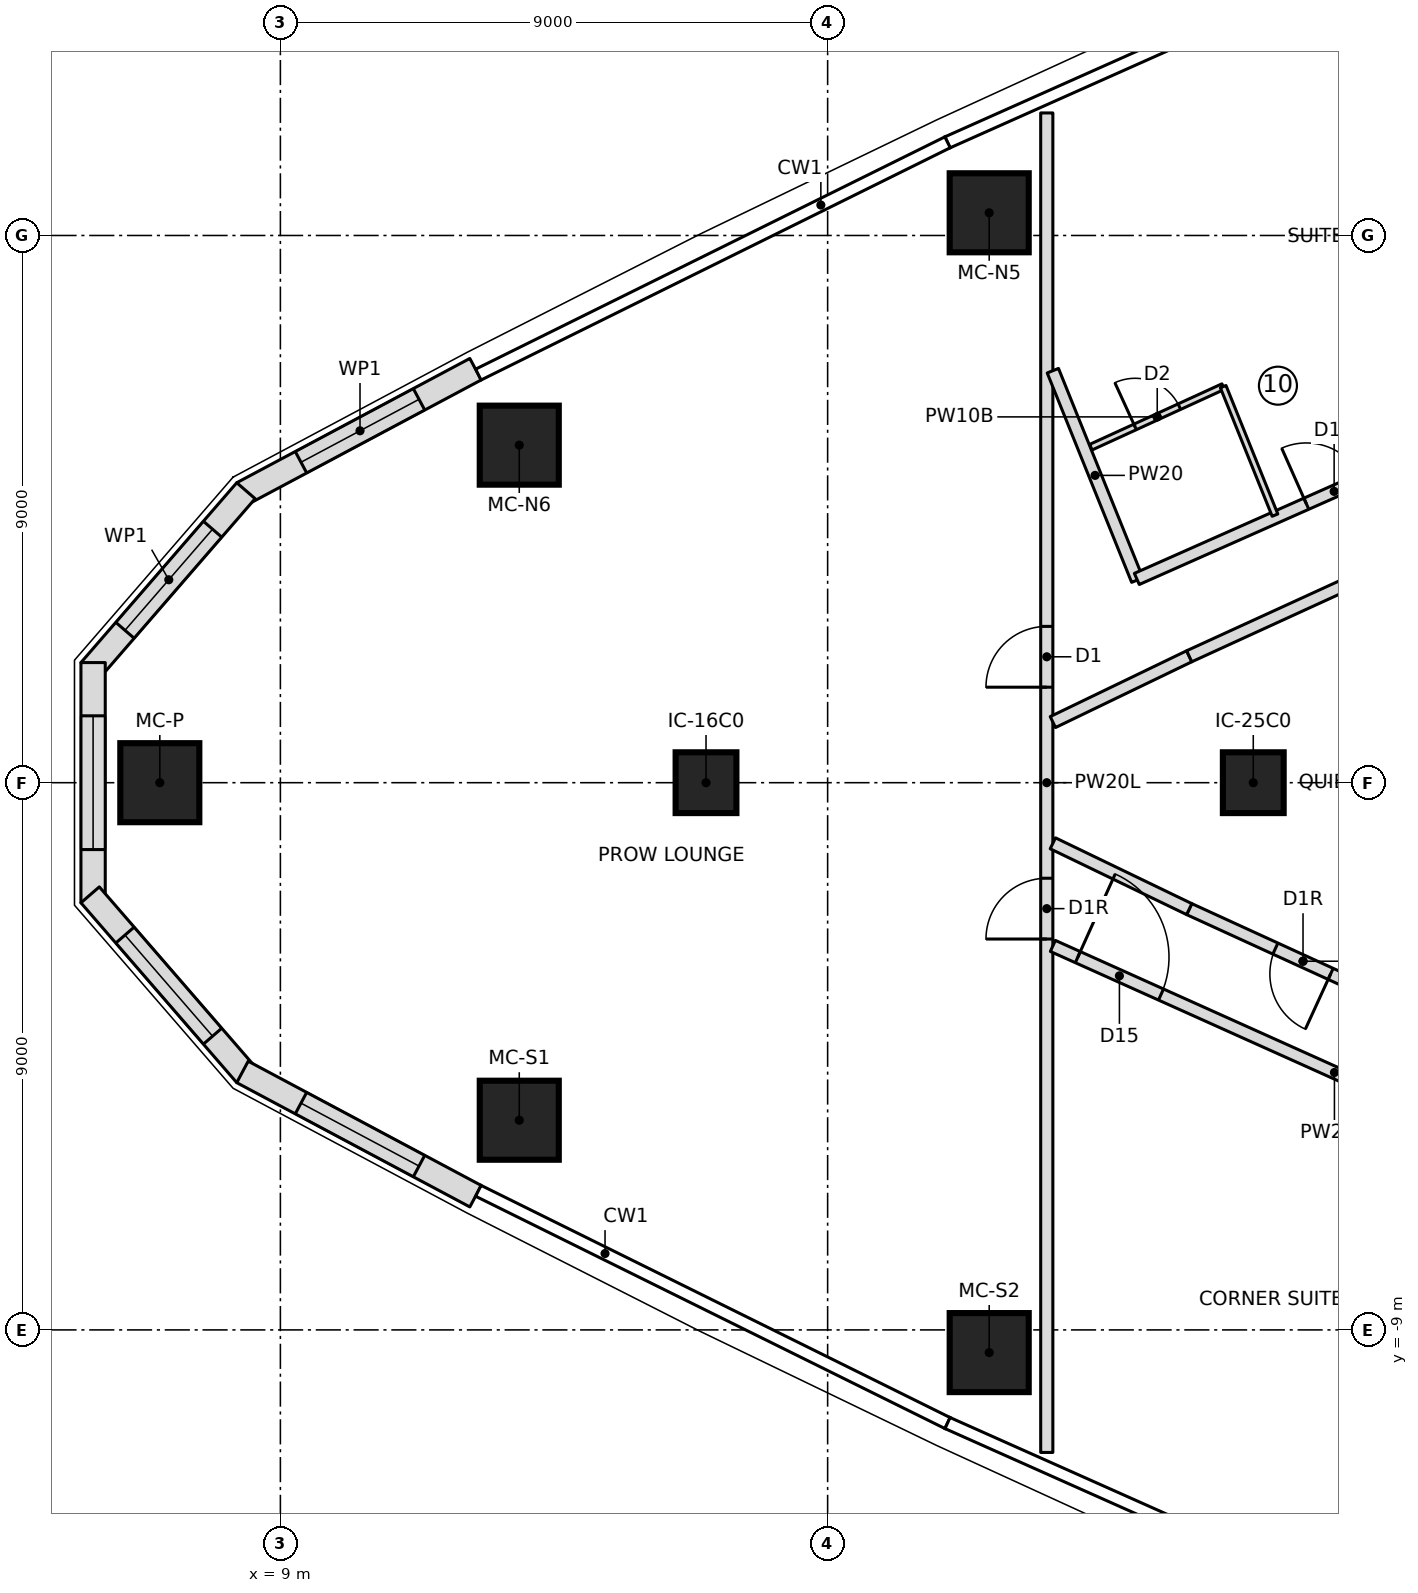
"""IFC4 building model, lengths in metres.
Left out: names, types, materials, properties, quantities, classifications, styles, units other than length and angle.
Written with IfcOpenShell. Run it as: python <this file> out.ifc"""

import sys

from ifc_helpers import new_model, si_unit, direction, frame, frame_2d, origin, origin_2d, place, context, subcontext, project, spatial, polyline, rectangle, outline, extrude, element, fill, save


model = new_model("IFC4")
c1 = context("Model", 3, precision=1e-05, world=origin(), true_north=direction((0.0, 1.0)))
c2 = subcontext(c1, "Body", "Model", "MODEL_VIEW")
j1 = project(units=[si_unit("LENGTHUNIT", "METRE"), si_unit("PLANEANGLEUNIT", "RADIAN")], contexts=[c1])
p1 = place(None, origin())
s1 = spatial("IfcSite", under=j1, at=p1, CompositionType="ELEMENT")
p2 = place(p1, origin())
s2 = spatial("IfcBuilding", under=s1, at=p2, CompositionType="ELEMENT")
p3 = place(p2, frame((0.0, 0.0, 175.5)))
s3 = spatial("IfcBuildingStorey", under=s2, at=p3, CompositionType="ELEMENT", Elevation=175.5)
for number, where, z_axis, x_axis in (
    (1, (7.017, 0.0, 0.0), (0.0, 0.0, 1.0), (1.0, 0.0, 0.0)),
    (2, (12.929, -5.552, 0.0), (0.0, 0.0, 1.0), (1.0, 0.0, 0.0)),
    (3, (20.657, -9.373, 0.0), (0.0, 0.0, 1.0), (1.0, 0.0, 0.0)),
    (4, (20.657, 9.373, 0.0), (0.0, 0.0, 1.0), (1.0, 0.0, 0.0)),
    (5, (12.929, 5.552, 0.0), (0.0, 0.0, 1.0), (1.0, 0.0, 0.0)),
):
    element("IfcColumn", number, at=place(p3, frame(where, z_axis=z_axis, x_axis=x_axis)), inside=s3, PredefinedType="COLUMN", context=c2, shape_type="SweptSolid", body=[
        extrude(rectangle(XDim=1.3, YDim=1.3, at=origin_2d()), origin(), (0.0, 0.0, 1.0), 3.55),
    ])
for number, where, z_axis, x_axis in (
    (6, (16.0, 0.0, 0.0), (0.0, 0.0, 1.0), (1.0, 0.0, 0.0)),
    (7, (25.0, 0.0, 0.0), (0.0, 0.0, 1.0), (1.0, 0.0, 0.0)),
):
    element("IfcColumn", number, at=place(p3, frame(where, z_axis=z_axis, x_axis=x_axis)), inside=s3, PredefinedType="COLUMN", context=c2, shape_type="SweptSolid", body=[
        extrude(rectangle(XDim=1.0, YDim=1.0, at=origin_2d()), origin(), (0.0, 0.0, 1.0), 3.55),
    ])
p4 = place(p3, frame((12.21, 6.801, 0.0), z_axis=(0.0, 0.0, 1.0), x_axis=(-0.882385889746, -0.470526451518, 0.0)))
e8 = element("IfcWall", 8, at=p4, inside=s3, PredefinedType="NOTDEFINED", context=c2, shape_type="SweptSolid", body=[
    extrude(outline(polyline([(0.0, -0.2), (4.344, -0.2), (4.27, 0.2), (0.0, 0.2), (0.0, -0.2)])), origin(), (0.0, 0.0, 1.0), 3.25),
])
p5 = place(p4, frame((1.053, 0.0, 0.6)))
e9 = element("IfcOpeningElement", 9, at=p5, cuts=e8, PredefinedType="OPENING", context=c2, shape_type="SweptSolid", body=[
    extrude(outline(polyline([(0.0, 1.35), (0.084, 1.771), (0.322, 2.128), (0.679, 2.366), (1.1, 2.45), (1.521, 2.366), (1.878, 2.128), (2.116, 1.771), (2.2, 1.35), (2.2, 1.1), (2.116, 0.679), (1.878, 0.322), (1.521, 0.084), (1.1, 0.0), (0.679, 0.084), (0.322, 0.322), (0.084, 0.679), (0.0, 1.1), (0.0, 1.35)])), frame((0.0, 0.21, 0.0), z_axis=(0.0, -1.0, 0.0), x_axis=(1.0, 0.0, 0.0)), (0.0, 0.0, 1.0), 0.42),
])
p6 = place(p3, frame((8.409, 4.774, 0.0), z_axis=(0.0, 0.0, 1.0), x_axis=(-0.654759384203, -0.755837382509, 0.0)))
e10 = element("IfcWall", 10, at=p6, inside=s3, PredefinedType="NOTDEFINED", context=c2, shape_type="SweptSolid", body=[
    extrude(outline(polyline([(-0.037, -0.2), (3.876, -0.2), (3.727, 0.2), (0.037, 0.2), (-0.037, -0.2)])), origin(), (0.0, 0.0, 1.0), 3.25),
])
p7 = place(p6, frame((0.801, 0.0, 0.6)))
e11 = element("IfcOpeningElement", 11, at=p7, cuts=e10, PredefinedType="OPENING", context=c2, shape_type="SweptSolid", body=[
    extrude(outline(polyline([(0.0, 1.35), (0.084, 1.771), (0.322, 2.128), (0.679, 2.366), (1.1, 2.45), (1.521, 2.366), (1.878, 2.128), (2.116, 1.771), (2.2, 1.35), (2.2, 1.1), (2.116, 0.679), (1.878, 0.322), (1.521, 0.084), (1.1, 0.0), (0.679, 0.084), (0.322, 0.322), (0.084, 0.679), (0.0, 1.1), (0.0, 1.35)])), frame((0.0, 0.21, 0.0), z_axis=(0.0, -1.0, 0.0), x_axis=(1.0, 0.0, 0.0)), (0.0, 0.0, 1.0), 0.42),
])
p8 = place(p3, frame((5.92, 1.901, 0.0), z_axis=(0.0, 0.0, 1.0), x_axis=(0.0, -1.0, 0.0)))
e12 = element("IfcWall", 12, at=p8, inside=s3, PredefinedType="NOTDEFINED", context=c2, shape_type="SweptSolid", body=[
    extrude(outline(polyline([(-0.075, -0.2), (3.876, -0.2), (3.727, 0.2), (0.075, 0.2), (-0.075, -0.2)])), origin(), (0.0, 0.0, 1.0), 3.25),
])
p9 = place(p8, frame((0.801, 0.0, 0.6)))
e13 = element("IfcOpeningElement", 13, at=p9, cuts=e12, PredefinedType="OPENING", context=c2, shape_type="SweptSolid", body=[
    extrude(outline(polyline([(0.0, 1.35), (0.084, 1.771), (0.322, 2.128), (0.679, 2.366), (1.1, 2.45), (1.521, 2.366), (1.878, 2.128), (2.116, 1.771), (2.2, 1.35), (2.2, 1.1), (2.116, 0.679), (1.878, 0.322), (1.521, 0.084), (1.1, 0.0), (0.679, 0.084), (0.322, 0.322), (0.084, 0.679), (0.0, 1.1), (0.0, 1.35)])), frame((0.0, 0.21, 0.0), z_axis=(0.0, -1.0, 0.0), x_axis=(1.0, 0.0, 0.0)), (0.0, 0.0, 1.0), 0.42),
])
p10 = place(p3, frame((5.92, -1.901, 0.0), z_axis=(0.0, 0.0, 1.0), x_axis=(0.654759384203, -0.755837382509, 0.0)))
e14 = element("IfcWall", 14, at=p10, inside=s3, PredefinedType="NOTDEFINED", context=c2, shape_type="SweptSolid", body=[
    extrude(outline(polyline([(-0.075, -0.2), (3.839, -0.2), (3.765, 0.2), (0.075, 0.2), (-0.075, -0.2)])), origin(), (0.0, 0.0, 1.0), 3.25),
])
p11 = place(p10, frame((0.801, 0.0, 0.6)))
e15 = element("IfcOpeningElement", 15, at=p11, cuts=e14, PredefinedType="OPENING", context=c2, shape_type="SweptSolid", body=[
    extrude(outline(polyline([(0.0, 1.35), (0.084, 1.771), (0.322, 2.128), (0.679, 2.366), (1.1, 2.45), (1.521, 2.366), (1.878, 2.128), (2.116, 1.771), (2.2, 1.35), (2.2, 1.1), (2.116, 0.679), (1.878, 0.322), (1.521, 0.084), (1.1, 0.0), (0.679, 0.084), (0.322, 0.322), (0.084, 0.679), (0.0, 1.1), (0.0, 1.35)])), frame((0.0, 0.21, 0.0), z_axis=(0.0, -1.0, 0.0), x_axis=(1.0, 0.0, 0.0)), (0.0, 0.0, 1.0), 0.42),
])
p12 = place(p3, frame((8.409, -4.774, 0.0), z_axis=(0.0, 0.0, 1.0), x_axis=(0.882385889746, -0.470526451518, 0.0)))
e16 = element("IfcWall", 16, at=p12, inside=s3, PredefinedType="NOTDEFINED", context=c2, shape_type="SweptSolid", body=[
    extrude(outline(polyline([(-0.037, -0.2), (4.307, -0.2), (4.307, 0.2), (0.037, 0.2), (-0.037, -0.2)])), origin(), (0.0, 0.0, 1.0), 3.25),
])
p13 = place(p12, frame((1.053, 0.0, 0.6)))
e17 = element("IfcOpeningElement", 17, at=p13, cuts=e16, PredefinedType="OPENING", context=c2, shape_type="SweptSolid", body=[
    extrude(outline(polyline([(0.0, 1.35), (0.084, 1.771), (0.322, 2.128), (0.679, 2.366), (1.1, 2.45), (1.521, 2.366), (1.878, 2.128), (2.116, 1.771), (2.2, 1.35), (2.2, 1.1), (2.116, 0.679), (1.878, 0.322), (1.521, 0.084), (1.1, 0.0), (0.679, 0.084), (0.322, 0.322), (0.084, 0.679), (0.0, 1.1), (0.0, 1.35)])), frame((0.0, 0.21, 0.0), z_axis=(0.0, -1.0, 0.0), x_axis=(1.0, 0.0, 0.0)), (0.0, 0.0, 1.0), 0.42),
])
p14 = place(p3, frame((21.604, -11.015, 0.0), z_axis=(0.0, 0.0, 1.0), x_axis=(0.0, 1.0, 0.0)))
e18 = element("IfcWall", 18, at=p14, inside=s3, PredefinedType="PARTITIONING", context=c2, shape_type="SweptSolid", body=[
    extrude(rectangle(XDim=22.031, YDim=0.2, at=frame_2d((11.015, 0.0))), origin(), (0.0, 0.0, 1.0), 3.25),
])
p15 = place(p14, frame((12.586, 0.0, 0.0)))
e19 = element("IfcOpeningElement", 19, at=p15, cuts=e18, PredefinedType="OPENING", context=c2, shape_type="SweptSolid", body=[
    extrude(rectangle(XDim=1.0, YDim=2.1, at=frame_2d((0.5, 1.05))), frame((0.0, 0.11, 0.0), z_axis=(0.0, -1.0, 0.0), x_axis=(1.0, 0.0, 0.0)), (0.0, 0.0, 1.0), 0.22),
])
p16 = place(p14, frame((8.444, 0.0, 0.0)))
e20 = element("IfcOpeningElement", 20, at=p16, cuts=e18, PredefinedType="OPENING", context=c2, shape_type="SweptSolid", body=[
    extrude(rectangle(XDim=1.0, YDim=2.1, at=frame_2d((0.5, 1.05))), frame((0.0, 0.11, 0.0), z_axis=(0.0, -1.0, 0.0), x_axis=(1.0, 0.0, 0.0)), (0.0, 0.0, 1.0), 0.22),
])
p17 = place(p3, frame((23.092, 3.333, 0.0), z_axis=(0.0, 0.0, 1.0), x_axis=(-0.373883495288, 0.927475677283, 0.0)))
e21 = element("IfcWall", 21, at=p17, inside=s3, PredefinedType="PARTITIONING", context=c2, shape_type="SweptSolid", body=[
    extrude(rectangle(XDim=3.713, YDim=0.2, at=frame_2d((1.856, 0.0))), origin(), (0.0, 0.0, 1.0), 3.25),
])
p18 = place(p3, frame((23.085, 3.351, 0.0), z_axis=(0.0, 0.0, 1.0), x_axis=(0.914065936171, 0.405565610392, 0.0)))
e22 = element("IfcWall", 22, at=p18, inside=s3, PredefinedType="PARTITIONING", context=c2, shape_type="SweptSolid", body=[
    extrude(rectangle(XDim=8.622, YDim=0.2, at=frame_2d((4.311, 0.0))), origin(), (0.0, 0.0, 1.0), 3.25),
])
p19 = place(p18, frame((3.05, 0.0, 0.0)))
e23 = element("IfcOpeningElement", 23, at=p19, cuts=e22, PredefinedType="OPENING", context=c2, shape_type="SweptSolid", body=[
    extrude(rectangle(XDim=1.0, YDim=2.1, at=frame_2d((0.5, 1.05))), frame((0.0, 0.11, 0.0), z_axis=(0.0, -1.0, 0.0), x_axis=(1.0, 0.0, 0.0)), (0.0, 0.0, 1.0), 0.22),
])
p20 = place(p3, frame((22.33, 5.518, 0.0), z_axis=(0.0, 0.0, 1.0), x_axis=(0.909209708064, 0.416338452178, 0.0)))
e24 = element("IfcWall", 24, at=p20, inside=s3, PredefinedType="PARTITIONING", context=c2, shape_type="SweptSolid", body=[
    extrude(rectangle(XDim=2.393, YDim=0.1, at=frame_2d((1.196, 0.0))), origin(), (0.0, 0.0, 1.0), 3.25),
])
p21 = place(p20, frame((0.8, 0.0, 0.0)))
e25 = element("IfcOpeningElement", 25, at=p21, cuts=e24, PredefinedType="OPENING", context=c2, shape_type="SweptSolid", body=[
    extrude(rectangle(XDim=0.8, YDim=2.1, at=frame_2d((0.4, 1.05))), frame((0.0, 0.06, 0.0), z_axis=(0.0, -1.0, 0.0), x_axis=(1.0, 0.0, 0.0)), (0.0, 0.0, 1.0), 0.12),
])
p22 = place(p3, frame((24.505, 6.514, 0.0), z_axis=(0.0, 0.0, 1.0), x_axis=(0.373919298041, -0.927461243693, 0.0)))
e26 = element("IfcWall", 26, at=p22, inside=s3, PredefinedType="PARTITIONING", context=c2, shape_type="SweptSolid", body=[
    extrude(rectangle(XDim=2.279, YDim=0.1, at=frame_2d((1.14, 0.0))), origin(), (0.0, 0.0, 1.0), 3.25),
])
p23 = place(p3, frame((21.704, -2.685, 0.0), z_axis=(0.0, 0.0, 1.0), x_axis=(0.912095082087, -0.409978732659, 0.0)))
e27 = element("IfcWall", 27, at=p23, inside=s3, PredefinedType="PARTITIONING", context=c2, shape_type="SweptSolid", body=[
    extrude(rectangle(XDim=10.154, YDim=0.2, at=frame_2d((5.077, 0.0))), origin(), (0.0, 0.0, 1.0), 3.25),
])
p24 = place(p23, frame((0.45, 0.0, 0.0)))
e28 = element("IfcOpeningElement", 28, at=p24, cuts=e27, PredefinedType="OPENING", context=c2, shape_type="SweptSolid", body=[
    extrude(rectangle(XDim=1.5, YDim=2.1, at=frame_2d((0.75, 1.05))), frame((0.0, 0.11, 0.0), z_axis=(0.0, -1.0, 0.0), x_axis=(1.0, 0.0, 0.0)), (0.0, 0.0, 1.0), 0.22),
])
p25 = place(p3, frame((27.69, -3.793, 0.0), z_axis=(0.0, 0.0, 1.0), x_axis=(-0.909180834404, 0.416401501382, 0.0)))
e29 = element("IfcWall", 29, at=p25, inside=s3, PredefinedType="PARTITIONING", context=c2, shape_type="SweptSolid", body=[
    extrude(rectangle(XDim=4.117, YDim=0.2, at=frame_2d((2.059, 0.0))), origin(), (0.0, 0.0, 1.0), 3.25),
])
p26 = place(p25, frame((1.559, 0.0, 0.0)))
e30 = element("IfcOpeningElement", 30, at=p26, cuts=e29, PredefinedType="OPENING", context=c2, shape_type="SweptSolid", body=[
    extrude(rectangle(XDim=1.0, YDim=2.1, at=frame_2d((0.5, 1.05))), frame((0.0, 0.11, 0.0), z_axis=(0.0, -1.0, 0.0), x_axis=(1.0, 0.0, 0.0)), (0.0, 0.0, 1.0), 0.22),
])
for number, where, z_axis, x_axis in (
    (31, (23.947, -2.079, 0.0), (0.0, 0.0, 1.0), (-0.901, 0.435, 0.0)),
    (32, (21.704, 0.997, 0.0), (0.0, 0.0, 1.0), (0.901, 0.435, 0.0)),
):
    element("IfcWall", number, at=place(p3, frame(where, z_axis=z_axis, x_axis=x_axis)), inside=s3, PredefinedType="PARTITIONING", context=c2, shape_type="SweptSolid", body=[
        extrude(rectangle(XDim=2.49, YDim=0.2, at=frame_2d((1.245, 0.0))), origin(), (0.0, 0.0, 1.0), 3.25),
    ])
p27 = place(p3, frame((23.947, 2.079, 0.0), z_axis=(0.0, 0.0, 1.0), x_axis=(0.909180834404, 0.416401501382, 0.0)))
e33 = element("IfcWall", 33, at=p27, inside=s3, PredefinedType="PARTITIONING", context=c2, shape_type="SweptSolid", body=[
    extrude(rectangle(XDim=4.117, YDim=0.2, at=frame_2d((2.059, 0.0))), origin(), (0.0, 0.0, 1.0), 3.25),
])
p28 = place(p5, origin())
e34 = element("IfcWindow", 34, at=p28, inside=s3, PartitioningType="SINGLE_PANEL", PredefinedType="WINDOW", context=c2, shape_type="SweptSolid", body=[
    extrude(outline(polyline([(0.0, 1.35), (0.084, 1.771), (0.322, 2.128), (0.679, 2.366), (1.1, 2.45), (1.521, 2.366), (1.878, 2.128), (2.116, 1.771), (2.2, 1.35), (2.2, 1.1), (2.116, 0.679), (1.878, 0.322), (1.521, 0.084), (1.1, 0.0), (0.679, 0.084), (0.322, 0.322), (0.084, 0.679), (0.0, 1.1), (0.0, 1.35)])), frame((0.0, 0.17, 0.0), z_axis=(0.0, -1.0, 0.0), x_axis=(1.0, 0.0, 0.0)), (0.0, 0.0, 1.0), 0.06),
])
fill(e9, e34)
p29 = place(p7, origin())
e35 = element("IfcWindow", 35, at=p29, inside=s3, PartitioningType="SINGLE_PANEL", PredefinedType="WINDOW", context=c2, shape_type="SweptSolid", body=[
    extrude(outline(polyline([(0.0, 1.35), (0.084, 1.771), (0.322, 2.128), (0.679, 2.366), (1.1, 2.45), (1.521, 2.366), (1.878, 2.128), (2.116, 1.771), (2.2, 1.35), (2.2, 1.1), (2.116, 0.679), (1.878, 0.322), (1.521, 0.084), (1.1, 0.0), (0.679, 0.084), (0.322, 0.322), (0.084, 0.679), (0.0, 1.1), (0.0, 1.35)])), frame((0.0, 0.17, 0.0), z_axis=(0.0, -1.0, 0.0), x_axis=(1.0, 0.0, 0.0)), (0.0, 0.0, 1.0), 0.06),
])
fill(e11, e35)
p30 = place(p9, origin())
e36 = element("IfcWindow", 36, at=p30, inside=s3, PartitioningType="SINGLE_PANEL", PredefinedType="WINDOW", context=c2, shape_type="SweptSolid", body=[
    extrude(outline(polyline([(0.0, 1.35), (0.084, 1.771), (0.322, 2.128), (0.679, 2.366), (1.1, 2.45), (1.521, 2.366), (1.878, 2.128), (2.116, 1.771), (2.2, 1.35), (2.2, 1.1), (2.116, 0.679), (1.878, 0.322), (1.521, 0.084), (1.1, 0.0), (0.679, 0.084), (0.322, 0.322), (0.084, 0.679), (0.0, 1.1), (0.0, 1.35)])), frame((0.0, 0.17, 0.0), z_axis=(0.0, -1.0, 0.0), x_axis=(1.0, 0.0, 0.0)), (0.0, 0.0, 1.0), 0.06),
])
fill(e13, e36)
p31 = place(p11, origin())
e37 = element("IfcWindow", 37, at=p31, inside=s3, PartitioningType="SINGLE_PANEL", PredefinedType="WINDOW", context=c2, shape_type="SweptSolid", body=[
    extrude(outline(polyline([(0.0, 1.35), (0.084, 1.771), (0.322, 2.128), (0.679, 2.366), (1.1, 2.45), (1.521, 2.366), (1.878, 2.128), (2.116, 1.771), (2.2, 1.35), (2.2, 1.1), (2.116, 0.679), (1.878, 0.322), (1.521, 0.084), (1.1, 0.0), (0.679, 0.084), (0.322, 0.322), (0.084, 0.679), (0.0, 1.1), (0.0, 1.35)])), frame((0.0, 0.17, 0.0), z_axis=(0.0, -1.0, 0.0), x_axis=(1.0, 0.0, 0.0)), (0.0, 0.0, 1.0), 0.06),
])
fill(e15, e37)
p32 = place(p13, origin())
e38 = element("IfcWindow", 38, at=p32, inside=s3, PartitioningType="SINGLE_PANEL", PredefinedType="WINDOW", context=c2, shape_type="SweptSolid", body=[
    extrude(outline(polyline([(0.0, 1.35), (0.084, 1.771), (0.322, 2.128), (0.679, 2.366), (1.1, 2.45), (1.521, 2.366), (1.878, 2.128), (2.116, 1.771), (2.2, 1.35), (2.2, 1.1), (2.116, 0.679), (1.878, 0.322), (1.521, 0.084), (1.1, 0.0), (0.679, 0.084), (0.322, 0.322), (0.084, 0.679), (0.0, 1.1), (0.0, 1.35)])), frame((0.0, 0.17, 0.0), z_axis=(0.0, -1.0, 0.0), x_axis=(1.0, 0.0, 0.0)), (0.0, 0.0, 1.0), 0.06),
])
fill(e17, e38)
p33 = place(p15, origin())
e39 = element("IfcDoor", 39, at=p33, inside=s3, OperationType="SINGLE_SWING_LEFT", PredefinedType="DOOR", context=c2, shape_type="SweptSolid", body=[
    extrude(rectangle(XDim=1.0, YDim=2.1, at=frame_2d((0.5, 1.05))), frame((0.0, 0.025, 0.0), z_axis=(0.0, -1.0, 0.0), x_axis=(1.0, 0.0, 0.0)), (0.0, 0.0, 1.0), 0.05),
])
fill(e19, e39)
p34 = place(p16, origin())
e40 = element("IfcDoor", 40, at=p34, inside=s3, OperationType="SINGLE_SWING_RIGHT", PredefinedType="DOOR", context=c2, shape_type="SweptSolid", body=[
    extrude(rectangle(XDim=1.0, YDim=2.1, at=frame_2d((0.5, 1.05))), frame((0.0, 0.025, 0.0), z_axis=(0.0, -1.0, 0.0), x_axis=(1.0, 0.0, 0.0)), (0.0, 0.0, 1.0), 0.05),
])
fill(e20, e40)
p35 = place(p21, origin())
e41 = element("IfcDoor", 41, at=p35, inside=s3, OperationType="SINGLE_SWING_LEFT", PredefinedType="DOOR", context=c2, shape_type="SweptSolid", body=[
    extrude(rectangle(XDim=0.8, YDim=2.1, at=frame_2d((0.4, 1.05))), frame((0.0, 0.025, 0.0), z_axis=(0.0, -1.0, 0.0), x_axis=(1.0, 0.0, 0.0)), (0.0, 0.0, 1.0), 0.05),
])
fill(e25, e41)
p36 = place(p19, origin())
e42 = element("IfcDoor", 42, at=p36, inside=s3, OperationType="SINGLE_SWING_RIGHT", PredefinedType="DOOR", context=c2, shape_type="SweptSolid", body=[
    extrude(rectangle(XDim=1.0, YDim=2.1, at=frame_2d((0.5, 1.05))), frame((0.0, 0.025, 0.0), z_axis=(0.0, -1.0, 0.0), x_axis=(1.0, 0.0, 0.0)), (0.0, 0.0, 1.0), 0.05),
])
fill(e23, e42)
p37 = place(p24, origin())
e43 = element("IfcDoor", 43, at=p37, inside=s3, OperationType="DOUBLE_DOOR_SINGLE_SWING", PredefinedType="DOOR", context=c2, shape_type="SweptSolid", body=[
    extrude(rectangle(XDim=1.5, YDim=2.1, at=frame_2d((0.75, 1.05))), frame((0.0, 0.025, 0.0), z_axis=(0.0, -1.0, 0.0), x_axis=(1.0, 0.0, 0.0)), (0.0, 0.0, 1.0), 0.05),
])
fill(e28, e43)
p38 = place(p26, origin())
e44 = element("IfcDoor", 44, at=p38, inside=s3, OperationType="SINGLE_SWING_RIGHT", PredefinedType="DOOR", context=c2, shape_type="SweptSolid", body=[
    extrude(rectangle(XDim=1.0, YDim=2.1, at=frame_2d((0.5, 1.05))), frame((0.0, 0.025, 0.0), z_axis=(0.0, -1.0, 0.0), x_axis=(1.0, 0.0, 0.0)), (0.0, 0.0, 1.0), 0.05),
])
fill(e30, e44)
save(model, sys.argv[1])
